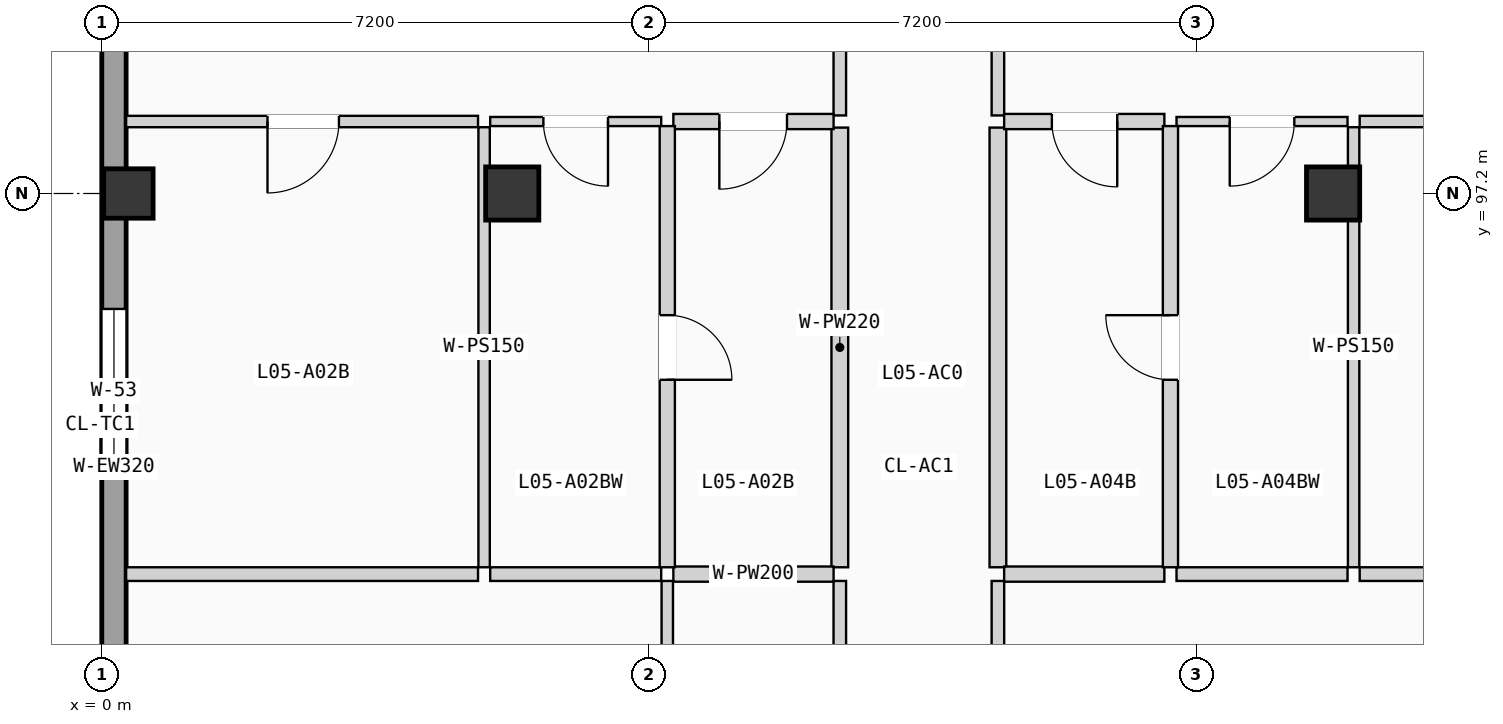
"""IFC4 building model, lengths in metres.
Left out: names, types, materials, properties, quantities, classifications, styles, units other than length and angle.
Written with IfcOpenShell. Run it as: python <this file> out.ifc"""

import sys

from ifc_helpers import new_model, si_unit, direction, frame, frame_2d, origin, origin_2d, place, context, subcontext, project, spatial, rectangle, extrude, element, fill, save


model = new_model("IFC4")
c1 = context("Model", 3, precision=1e-05, world=origin(), true_north=direction((0.0, 1.0)))
c2 = subcontext(c1, "Body", "Model", "MODEL_VIEW")
j1 = project(units=[si_unit("LENGTHUNIT", "METRE"), si_unit("PLANEANGLEUNIT", "RADIAN")], contexts=[c1])
p1 = place(None, origin())
s1 = spatial("IfcSite", under=j1, at=p1, CompositionType="ELEMENT")
p2 = place(p1, origin())
s2 = spatial("IfcBuilding", under=s1, at=p2, CompositionType="ELEMENT")
p3 = place(p2, frame((0.0, 0.0, 18.375)))
s3 = spatial("IfcBuildingStorey", under=s2, at=p3, CompositionType="ELEMENT", Elevation=18.375)
p4 = place(p3, frame((0.35, 97.2, 0.0), z_axis=(0.0, 0.0, 1.0), x_axis=(1.0, 0.0, 0.0)))
e1 = element("IfcColumn", 1, at=p4, inside=s3, PredefinedType="COLUMN", context=c2, shape_type="SweptSolid", body=[
    extrude(rectangle(XDim=0.65, YDim=0.65, at=origin_2d()), origin(), (0.0, 0.0, 1.0), 3.15),
])
for number, where, z_axis, x_axis in (
    (2, (5.4, 97.2, 0.0), (0.0, 0.0, 1.0), (1.0, 0.0, 0.0)),
    (3, (16.2, 97.2, 0.0), (0.0, 0.0, 1.0), (1.0, 0.0, 0.0)),
):
    element("IfcColumn", number, at=place(p3, frame(where, z_axis=z_axis, x_axis=x_axis)), inside=s3, PredefinedType="COLUMN", context=c2, shape_type="SweptSolid", body=[
        extrude(rectangle(XDim=0.7, YDim=0.7, at=origin_2d()), origin(), (0.0, 0.0, 1.0), 3.15),
    ])
p5 = place(p3, frame((0.16, 68.72, 0.0), z_axis=(0.0, 0.0, 1.0), x_axis=(0.0, 1.0, 0.0)))
e4 = element("IfcWall", 4, at=p5, inside=s3, PredefinedType="SOLIDWALL", context=c2, shape_type="SweptSolid", body=[
    extrude(rectangle(XDim=49.76, YDim=0.32, at=frame_2d((24.88, 0.0))), origin(), (0.0, 0.0, 1.0), 2.89),
])
p6 = place(p5, frame((15.33, 0.0, 0.555)))
e5 = element("IfcOpeningElement", 5, at=p6, cuts=e4, PredefinedType="OPENING", context=c2, shape_type="SweptSolid", body=[
    extrude(rectangle(XDim=2.0, YDim=1.65, at=frame_2d((1.0, 0.825))), frame((0.0, 0.17, 0.0), z_axis=(0.0, -1.0, 0.0), x_axis=(1.0, 0.0, 0.0)), (0.0, 0.0, 1.0), 0.34),
])
p7 = place(p5, frame((9.261, 0.0, 0.85)))
e6 = element("IfcOpeningElement", 6, at=p7, cuts=e4, PredefinedType="OPENING", context=c2, shape_type="SweptSolid", body=[
    extrude(rectangle(XDim=0.95, YDim=1.2, at=frame_2d((0.475, 0.6))), frame((0.0, 0.17, 0.0), z_axis=(0.0, -1.0, 0.0), x_axis=(1.0, 0.0, 0.0)), (0.0, 0.0, 1.0), 0.34),
])
p8 = place(p5, frame((19.265, 0.0, 0.85)))
e7 = element("IfcOpeningElement", 7, at=p8, cuts=e4, PredefinedType="OPENING", context=c2, shape_type="SweptSolid", body=[
    extrude(rectangle(XDim=0.95, YDim=1.2, at=frame_2d((0.475, 0.6))), frame((0.0, 0.17, 0.0), z_axis=(0.0, -1.0, 0.0), x_axis=(1.0, 0.0, 0.0)), (0.0, 0.0, 1.0), 0.34),
])
p9 = place(p5, frame((31.384, 0.0, 0.855)))
e8 = element("IfcOpeningElement", 8, at=p9, cuts=e4, PredefinedType="OPENING", context=c2, shape_type="SweptSolid", body=[
    extrude(rectangle(XDim=2.15, YDim=1.35, at=frame_2d((1.075, 0.675))), frame((0.0, 0.17, 0.0), z_axis=(0.0, -1.0, 0.0), x_axis=(1.0, 0.0, 0.0)), (0.0, 0.0, 1.0), 0.34),
])
p10 = place(p5, frame((24.811, 0.0, 0.705)))
e9 = element("IfcOpeningElement", 9, at=p10, cuts=e4, PredefinedType="OPENING", context=c2, shape_type="SweptSolid", body=[
    extrude(rectangle(XDim=2.15, YDim=1.5, at=frame_2d((1.075, 0.75))), frame((0.0, 0.17, 0.0), z_axis=(0.0, -1.0, 0.0), x_axis=(1.0, 0.0, 0.0)), (0.0, 0.0, 1.0), 0.34),
])
p11 = place(p5, frame((38.513, 0.0, 0.555)))
e10 = element("IfcOpeningElement", 10, at=p11, cuts=e4, PredefinedType="OPENING", context=c2, shape_type="SweptSolid", body=[
    extrude(rectangle(XDim=2.15, YDim=1.65, at=frame_2d((1.075, 0.825))), frame((0.0, 0.17, 0.0), z_axis=(0.0, -1.0, 0.0), x_axis=(1.0, 0.0, 0.0)), (0.0, 0.0, 1.0), 0.34),
])
p12 = place(p3, frame((9.71, 87.19, 0.0), z_axis=(0.0, 0.0, 1.0), x_axis=(0.0, 1.0, 0.0)))
e11 = element("IfcWall", 11, at=p12, inside=s3, PredefinedType="PARTITIONING", context=c2, shape_type="SweptSolid", body=[
    extrude(rectangle(XDim=4.912, YDim=0.165, at=frame_2d((2.456, 0.0))), origin(), (0.0, 0.0, 1.0), 2.87),
])
p13 = place(p3, frame((9.71, 98.227, 0.0), z_axis=(0.0, 0.0, 1.0), x_axis=(0.0, 1.0, 0.0)))
e12 = element("IfcWall", 12, at=p13, inside=s3, PredefinedType="PARTITIONING", context=c2, shape_type="SweptSolid", body=[
    extrude(rectangle(XDim=7.028, YDim=0.165, at=frame_2d((3.514, 0.0))), origin(), (0.0, 0.0, 1.0), 2.87),
])
p14 = place(p13, frame((3.024, 0.0, 0.0)))
e13 = element("IfcOpeningElement", 13, at=p14, cuts=e12, PredefinedType="OPENING", context=c2, shape_type="SweptSolid", body=[
    extrude(rectangle(XDim=0.98, YDim=2.08, at=frame_2d((0.49, 1.04))), frame((0.0, 0.093, 0.0), z_axis=(0.0, -1.0, 0.0), x_axis=(1.0, 0.0, 0.0)), (0.0, 0.0, 1.0), 0.185),
])
p15 = place(p3, frame((9.71, 92.282, 0.0), z_axis=(0.0, 0.0, 1.0), x_axis=(0.0, 1.0, 0.0)))
e14 = element("IfcWall", 14, at=p15, inside=s3, PredefinedType="PLUMBINGWALL", context=c2, shape_type="SweptSolid", body=[
    extrude(rectangle(XDim=5.785, YDim=0.22, at=frame_2d((2.893, 0.0))), origin(), (0.0, 0.0, 1.0), 2.87),
])
p16 = place(p3, frame((11.79, 84.141, 0.0), z_axis=(0.0, 0.0, 1.0), x_axis=(0.0, 1.0, 0.0)))
e15 = element("IfcWall", 15, at=p16, inside=s3, PredefinedType="PARTITIONING", context=c2, shape_type="SweptSolid", body=[
    extrude(rectangle(XDim=7.961, YDim=0.165, at=frame_2d((3.98, 0.0))), origin(), (0.0, 0.0, 1.0), 2.87),
])
p17 = place(p16, frame((3.49, 0.0, 0.0)))
e16 = element("IfcOpeningElement", 16, at=p17, cuts=e15, PredefinedType="OPENING", context=c2, shape_type="SweptSolid", body=[
    extrude(rectangle(XDim=0.98, YDim=2.08, at=frame_2d((0.49, 1.04))), frame((0.0, 0.093, 0.0), z_axis=(0.0, -1.0, 0.0), x_axis=(1.0, 0.0, 0.0)), (0.0, 0.0, 1.0), 0.185),
])
p18 = place(p3, frame((11.79, 98.227, 0.0), z_axis=(0.0, 0.0, 1.0), x_axis=(0.0, 1.0, 0.0)))
e17 = element("IfcWall", 17, at=p18, inside=s3, PredefinedType="PARTITIONING", context=c2, shape_type="SweptSolid", body=[
    extrude(rectangle(XDim=7.028, YDim=0.165, at=frame_2d((3.514, 0.0))), origin(), (0.0, 0.0, 1.0), 2.87),
])
p19 = place(p18, frame((3.024, 0.0, 0.0)))
e18 = element("IfcOpeningElement", 18, at=p19, cuts=e17, PredefinedType="OPENING", context=c2, shape_type="SweptSolid", body=[
    extrude(rectangle(XDim=0.98, YDim=2.08, at=frame_2d((0.49, 1.04))), frame((0.0, 0.093, 0.0), z_axis=(0.0, -1.0, 0.0), x_axis=(1.0, 0.0, 0.0)), (0.0, 0.0, 1.0), 0.185),
])
p20 = place(p3, frame((11.79, 92.282, 0.0), z_axis=(0.0, 0.0, 1.0), x_axis=(0.0, 1.0, 0.0)))
e19 = element("IfcWall", 19, at=p20, inside=s3, PredefinedType="PLUMBINGWALL", context=c2, shape_type="SweptSolid", body=[
    extrude(rectangle(XDim=5.785, YDim=0.22, at=frame_2d((2.893, 0.0))), origin(), (0.0, 0.0, 1.0), 2.87),
])
p21 = place(p3, frame((7.44, 87.17, 0.0), z_axis=(0.0, 0.0, 1.0), x_axis=(0.0, 1.0, 0.0)))
e20 = element("IfcWall", 20, at=p21, inside=s3, PredefinedType="PARTITIONING", context=c2, shape_type="SweptSolid", body=[
    extrude(rectangle(XDim=4.932, YDim=0.15, at=frame_2d((2.466, 0.0))), origin(), (0.0, 0.0, 1.0), 2.87),
])
p22 = place(p3, frame((7.52, 92.192, 0.0), z_axis=(0.0, 0.0, 1.0), x_axis=(1.0, 0.0, 0.0)))
e21 = element("IfcWall", 21, at=p22, inside=s3, PredefinedType="PLUMBINGWALL", context=c2, shape_type="SweptSolid", body=[
    extrude(rectangle(XDim=2.108, YDim=0.2, at=frame_2d((1.054, 0.0))), origin(), (0.0, 0.0, 1.0), 2.87),
])
p23 = place(p3, frame((0.32, 92.192, 0.0), z_axis=(0.0, 0.0, 1.0), x_axis=(1.0, 0.0, 0.0)))
e22 = element("IfcWall", 22, at=p23, inside=s3, PredefinedType="PARTITIONING", context=c2, shape_type="SweptSolid", body=[
    extrude(rectangle(XDim=4.63, YDim=0.18, at=frame_2d((2.315, 0.0))), origin(), (0.0, 0.0, 1.0), 2.87),
])
p24 = place(p3, frame((5.11, 92.192, 0.0), z_axis=(0.0, 0.0, 1.0), x_axis=(1.0, 0.0, 0.0)))
e23 = element("IfcWall", 23, at=p24, inside=s3, PredefinedType="PARTITIONING", context=c2, shape_type="SweptSolid", body=[
    extrude(rectangle(XDim=2.25, YDim=0.18, at=frame_2d((1.125, 0.0))), origin(), (0.0, 0.0, 1.0), 2.87),
])
p25 = place(p3, frame((7.52, 98.147, 0.0), z_axis=(0.0, 0.0, 1.0), x_axis=(1.0, 0.0, 0.0)))
e24 = element("IfcWall", 24, at=p25, inside=s3, PredefinedType="PLUMBINGWALL", context=c2, shape_type="SweptSolid", body=[
    extrude(rectangle(XDim=2.108, YDim=0.2, at=frame_2d((1.054, 0.0))), origin(), (0.0, 0.0, 1.0), 2.87),
])
p26 = place(p25, frame((0.605, 0.0, 0.0)))
e25 = element("IfcOpeningElement", 25, at=p26, cuts=e24, PredefinedType="OPENING", context=c2, shape_type="SweptSolid", body=[
    extrude(rectangle(XDim=0.89, YDim=2.03, at=frame_2d((0.445, 1.015))), frame((0.0, 0.11, 0.0), z_axis=(0.0, -1.0, 0.0), x_axis=(1.0, 0.0, 0.0)), (0.0, 0.0, 1.0), 0.22),
])
p27 = place(p3, frame((0.32, 98.147, 0.0), z_axis=(0.0, 0.0, 1.0), x_axis=(1.0, 0.0, 0.0)))
e26 = element("IfcWall", 26, at=p27, inside=s3, PredefinedType="PARTITIONING", context=c2, shape_type="SweptSolid", body=[
    extrude(rectangle(XDim=4.63, YDim=0.15, at=frame_2d((2.315, 0.0))), origin(), (0.0, 0.0, 1.0), 2.87),
])
p28 = place(p27, frame((1.86, 0.0, 0.0)))
e27 = element("IfcOpeningElement", 27, at=p28, cuts=e26, PredefinedType="OPENING", context=c2, shape_type="SweptSolid", body=[
    extrude(rectangle(XDim=0.94, YDim=2.06, at=frame_2d((0.47, 1.03))), frame((0.0, 0.085, 0.0), z_axis=(0.0, -1.0, 0.0), x_axis=(1.0, 0.0, 0.0)), (0.0, 0.0, 1.0), 0.17),
])
p29 = place(p3, frame((5.11, 98.147, 0.0), z_axis=(0.0, 0.0, 1.0), x_axis=(1.0, 0.0, 0.0)))
e28 = element("IfcWall", 28, at=p29, inside=s3, PredefinedType="PARTITIONING", context=c2, shape_type="SweptSolid", body=[
    extrude(rectangle(XDim=2.25, YDim=0.12, at=frame_2d((1.125, 0.0))), origin(), (0.0, 0.0, 1.0), 2.87),
])
p30 = place(p29, frame((0.7, 0.0, 0.0)))
e29 = element("IfcOpeningElement", 29, at=p30, cuts=e28, PredefinedType="OPENING", context=c2, shape_type="SweptSolid", body=[
    extrude(rectangle(XDim=0.85, YDim=2.01, at=frame_2d((0.425, 1.005))), frame((0.0, 0.07, 0.0), z_axis=(0.0, -1.0, 0.0), x_axis=(1.0, 0.0, 0.0)), (0.0, 0.0, 1.0), 0.14),
])
p31 = place(p3, frame((7.44, 92.282, 0.0), z_axis=(0.0, 0.0, 1.0), x_axis=(0.0, 1.0, 0.0)))
e30 = element("IfcWall", 30, at=p31, inside=s3, PredefinedType="PLUMBINGWALL", context=c2, shape_type="SweptSolid", body=[
    extrude(rectangle(XDim=5.805, YDim=0.2, at=frame_2d((2.902, 0.0))), origin(), (0.0, 0.0, 1.0), 2.87),
])
p32 = place(p31, frame((2.467, 0.0, 0.0)))
e31 = element("IfcOpeningElement", 31, at=p32, cuts=e30, PredefinedType="OPENING", context=c2, shape_type="SweptSolid", body=[
    extrude(rectangle(XDim=0.85, YDim=2.01, at=frame_2d((0.425, 1.005))), frame((0.0, 0.11, 0.0), z_axis=(0.0, -1.0, 0.0), x_axis=(1.0, 0.0, 0.0)), (0.0, 0.0, 1.0), 0.22),
])
p33 = place(p3, frame((5.03, 92.282, 0.0), z_axis=(0.0, 0.0, 1.0), x_axis=(0.0, 1.0, 0.0)))
e32 = element("IfcWall", 32, at=p33, inside=s3, PredefinedType="PARTITIONING", context=c2, shape_type="SweptSolid", body=[
    extrude(rectangle(XDim=5.79, YDim=0.15, at=frame_2d((2.895, 0.0))), origin(), (0.0, 0.0, 1.0), 2.87),
])
p34 = place(p3, frame((11.872, 92.192, 0.0), z_axis=(0.0, 0.0, 1.0), x_axis=(1.0, 0.0, 0.0)))
e33 = element("IfcWall", 33, at=p34, inside=s3, PredefinedType="PLUMBINGWALL", context=c2, shape_type="SweptSolid", body=[
    extrude(rectangle(XDim=2.108, YDim=0.2, at=frame_2d((1.054, 0.0))), origin(), (0.0, 0.0, 1.0), 2.87),
])
p35 = place(p3, frame((16.55, 92.192, 0.0), z_axis=(0.0, 0.0, 1.0), x_axis=(1.0, 0.0, 0.0)))
e34 = element("IfcWall", 34, at=p35, inside=s3, PredefinedType="PARTITIONING", context=c2, shape_type="SweptSolid", body=[
    extrude(rectangle(XDim=4.73, YDim=0.18, at=frame_2d((2.365, 0.0))), origin(), (0.0, 0.0, 1.0), 2.87),
])
p36 = place(p3, frame((14.14, 92.192, 0.0), z_axis=(0.0, 0.0, 1.0), x_axis=(1.0, 0.0, 0.0)))
e35 = element("IfcWall", 35, at=p36, inside=s3, PredefinedType="PARTITIONING", context=c2, shape_type="SweptSolid", body=[
    extrude(rectangle(XDim=2.25, YDim=0.18, at=frame_2d((1.125, 0.0))), origin(), (0.0, 0.0, 1.0), 2.87),
])
p37 = place(p3, frame((11.872, 98.147, 0.0), z_axis=(0.0, 0.0, 1.0), x_axis=(1.0, 0.0, 0.0)))
e36 = element("IfcWall", 36, at=p37, inside=s3, PredefinedType="PLUMBINGWALL", context=c2, shape_type="SweptSolid", body=[
    extrude(rectangle(XDim=2.108, YDim=0.2, at=frame_2d((1.054, 0.0))), origin(), (0.0, 0.0, 1.0), 2.87),
])
p38 = place(p37, frame((0.628, 0.0, 0.0)))
e37 = element("IfcOpeningElement", 37, at=p38, cuts=e36, PredefinedType="OPENING", context=c2, shape_type="SweptSolid", body=[
    extrude(rectangle(XDim=0.86, YDim=2.0, at=frame_2d((0.43, 1.0))), frame((0.0, 0.11, 0.0), z_axis=(0.0, -1.0, 0.0), x_axis=(1.0, 0.0, 0.0)), (0.0, 0.0, 1.0), 0.22),
])
p39 = place(p3, frame((16.55, 98.147, 0.0), z_axis=(0.0, 0.0, 1.0), x_axis=(1.0, 0.0, 0.0)))
e38 = element("IfcWall", 38, at=p39, inside=s3, PredefinedType="PARTITIONING", context=c2, shape_type="SweptSolid", body=[
    extrude(rectangle(XDim=4.73, YDim=0.15, at=frame_2d((2.365, 0.0))), origin(), (0.0, 0.0, 1.0), 2.87),
])
p40 = place(p39, frame((1.81, 0.0, 0.0)))
e39 = element("IfcOpeningElement", 39, at=p40, cuts=e38, PredefinedType="OPENING", context=c2, shape_type="SweptSolid", body=[
    extrude(rectangle(XDim=1.08, YDim=2.1, at=frame_2d((0.54, 1.05))), frame((0.0, 0.085, 0.0), z_axis=(0.0, -1.0, 0.0), x_axis=(1.0, 0.0, 0.0)), (0.0, 0.0, 1.0), 0.17),
])
p41 = place(p3, frame((14.14, 98.147, 0.0), z_axis=(0.0, 0.0, 1.0), x_axis=(1.0, 0.0, 0.0)))
e40 = element("IfcWall", 40, at=p41, inside=s3, PredefinedType="PARTITIONING", context=c2, shape_type="SweptSolid", body=[
    extrude(rectangle(XDim=2.25, YDim=0.12, at=frame_2d((1.125, 0.0))), origin(), (0.0, 0.0, 1.0), 2.87),
])
p42 = place(p41, frame((0.7, 0.0, 0.0)))
e41 = element("IfcOpeningElement", 41, at=p42, cuts=e40, PredefinedType="OPENING", context=c2, shape_type="SweptSolid", body=[
    extrude(rectangle(XDim=0.85, YDim=2.01, at=frame_2d((0.425, 1.005))), frame((0.0, 0.07, 0.0), z_axis=(0.0, -1.0, 0.0), x_axis=(1.0, 0.0, 0.0)), (0.0, 0.0, 1.0), 0.14),
])
p43 = place(p3, frame((14.06, 92.282, 0.0), z_axis=(0.0, 0.0, 1.0), x_axis=(0.0, 1.0, 0.0)))
e42 = element("IfcWall", 42, at=p43, inside=s3, PredefinedType="PLUMBINGWALL", context=c2, shape_type="SweptSolid", body=[
    extrude(rectangle(XDim=5.805, YDim=0.2, at=frame_2d((2.902, 0.0))), origin(), (0.0, 0.0, 1.0), 2.87),
])
p44 = place(p43, frame((2.467, 0.0, 0.0)))
e43 = element("IfcOpeningElement", 43, at=p44, cuts=e42, PredefinedType="OPENING", context=c2, shape_type="SweptSolid", body=[
    extrude(rectangle(XDim=0.85, YDim=2.01, at=frame_2d((0.425, 1.005))), frame((0.0, 0.11, 0.0), z_axis=(0.0, -1.0, 0.0), x_axis=(1.0, 0.0, 0.0)), (0.0, 0.0, 1.0), 0.22),
])
p45 = place(p3, frame((16.47, 92.282, 0.0), z_axis=(0.0, 0.0, 1.0), x_axis=(0.0, 1.0, 0.0)))
e44 = element("IfcWall", 44, at=p45, inside=s3, PredefinedType="PARTITIONING", context=c2, shape_type="SweptSolid", body=[
    extrude(rectangle(XDim=5.79, YDim=0.15, at=frame_2d((2.895, 0.0))), origin(), (0.0, 0.0, 1.0), 2.87),
])
p46 = place(p10, origin())
e45 = element("IfcWindow", 45, at=p46, inside=s3, PartitioningType="DOUBLE_PANEL_VERTICAL", PredefinedType="WINDOW", context=c2, shape_type="SweptSolid", body=[
    extrude(rectangle(XDim=2.15, YDim=1.5, at=frame_2d((1.075, 0.75))), frame((0.0, 0.03, 0.0), z_axis=(0.0, -1.0, 0.0), x_axis=(1.0, 0.0, 0.0)), (0.0, 0.0, 1.0), 0.06),
])
fill(e9, e45)
p47 = place(p26, frame((0.89, 0.0, 0.0), z_axis=(0.0, 0.0, 1.0), x_axis=(-1.0, 0.0, 0.0)))
e46 = element("IfcDoor", 46, at=p47, inside=s3, OperationType="SINGLE_SWING_LEFT", PredefinedType="DOOR", context=c2, shape_type="SweptSolid", body=[
    extrude(rectangle(XDim=0.89, YDim=2.03, at=frame_2d((0.445, 1.015))), frame((0.0, 0.025, 0.0), z_axis=(0.0, -1.0, 0.0), x_axis=(1.0, 0.0, 0.0)), (0.0, 0.0, 1.0), 0.05),
])
fill(e25, e46)
p48 = place(p28, frame((0.94, 0.0, 0.0), z_axis=(0.0, 0.0, 1.0), x_axis=(-1.0, 0.0, 0.0)))
e47 = element("IfcDoor", 47, at=p48, inside=s3, OperationType="SINGLE_SWING_LEFT", PredefinedType="DOOR", context=c2, shape_type="SweptSolid", body=[
    extrude(rectangle(XDim=0.94, YDim=2.06, at=frame_2d((0.47, 1.03))), frame((0.0, 0.025, 0.0), z_axis=(0.0, -1.0, 0.0), x_axis=(1.0, 0.0, 0.0)), (0.0, 0.0, 1.0), 0.05),
])
fill(e27, e47)
p49 = place(p30, frame((0.85, 0.0, 0.0), z_axis=(0.0, 0.0, 1.0), x_axis=(-1.0, 0.0, 0.0)))
e48 = element("IfcDoor", 48, at=p49, inside=s3, OperationType="SINGLE_SWING_RIGHT", PredefinedType="DOOR", context=c2, shape_type="SweptSolid", body=[
    extrude(rectangle(XDim=0.85, YDim=2.01, at=frame_2d((0.425, 1.005))), frame((0.0, 0.025, 0.0), z_axis=(0.0, -1.0, 0.0), x_axis=(1.0, 0.0, 0.0)), (0.0, 0.0, 1.0), 0.05),
])
fill(e29, e48)
p50 = place(p32, frame((0.85, 0.0, 0.0), z_axis=(0.0, 0.0, 1.0), x_axis=(-1.0, 0.0, 0.0)))
e49 = element("IfcDoor", 49, at=p50, inside=s3, OperationType="SINGLE_SWING_LEFT", PredefinedType="DOOR", context=c2, shape_type="SweptSolid", body=[
    extrude(rectangle(XDim=0.85, YDim=2.01, at=frame_2d((0.425, 1.005))), frame((0.0, 0.025, 0.0), z_axis=(0.0, -1.0, 0.0), x_axis=(1.0, 0.0, 0.0)), (0.0, 0.0, 1.0), 0.05),
])
fill(e31, e49)
p51 = place(p38, frame((0.86, 0.0, 0.0), z_axis=(0.0, 0.0, 1.0), x_axis=(-1.0, 0.0, 0.0)))
e50 = element("IfcDoor", 50, at=p51, inside=s3, OperationType="SINGLE_SWING_RIGHT", PredefinedType="DOOR", context=c2, shape_type="SweptSolid", body=[
    extrude(rectangle(XDim=0.86, YDim=2.0, at=frame_2d((0.43, 1.0))), frame((0.0, 0.025, 0.0), z_axis=(0.0, -1.0, 0.0), x_axis=(1.0, 0.0, 0.0)), (0.0, 0.0, 1.0), 0.05),
])
fill(e37, e50)
p52 = place(p42, frame((0.85, 0.0, 0.0), z_axis=(0.0, 0.0, 1.0), x_axis=(-1.0, 0.0, 0.0)))
e51 = element("IfcDoor", 51, at=p52, inside=s3, OperationType="SINGLE_SWING_LEFT", PredefinedType="DOOR", context=c2, shape_type="SweptSolid", body=[
    extrude(rectangle(XDim=0.85, YDim=2.01, at=frame_2d((0.425, 1.005))), frame((0.0, 0.025, 0.0), z_axis=(0.0, -1.0, 0.0), x_axis=(1.0, 0.0, 0.0)), (0.0, 0.0, 1.0), 0.05),
])
fill(e41, e51)
p53 = place(p44, origin())
e52 = element("IfcDoor", 52, at=p53, inside=s3, OperationType="SINGLE_SWING_RIGHT", PredefinedType="DOOR", context=c2, shape_type="SweptSolid", body=[
    extrude(rectangle(XDim=0.85, YDim=2.01, at=frame_2d((0.425, 1.005))), frame((0.0, 0.025, 0.0), z_axis=(0.0, -1.0, 0.0), x_axis=(1.0, 0.0, 0.0)), (0.0, 0.0, 1.0), 0.05),
])
fill(e43, e52)
save(model, sys.argv[1])
